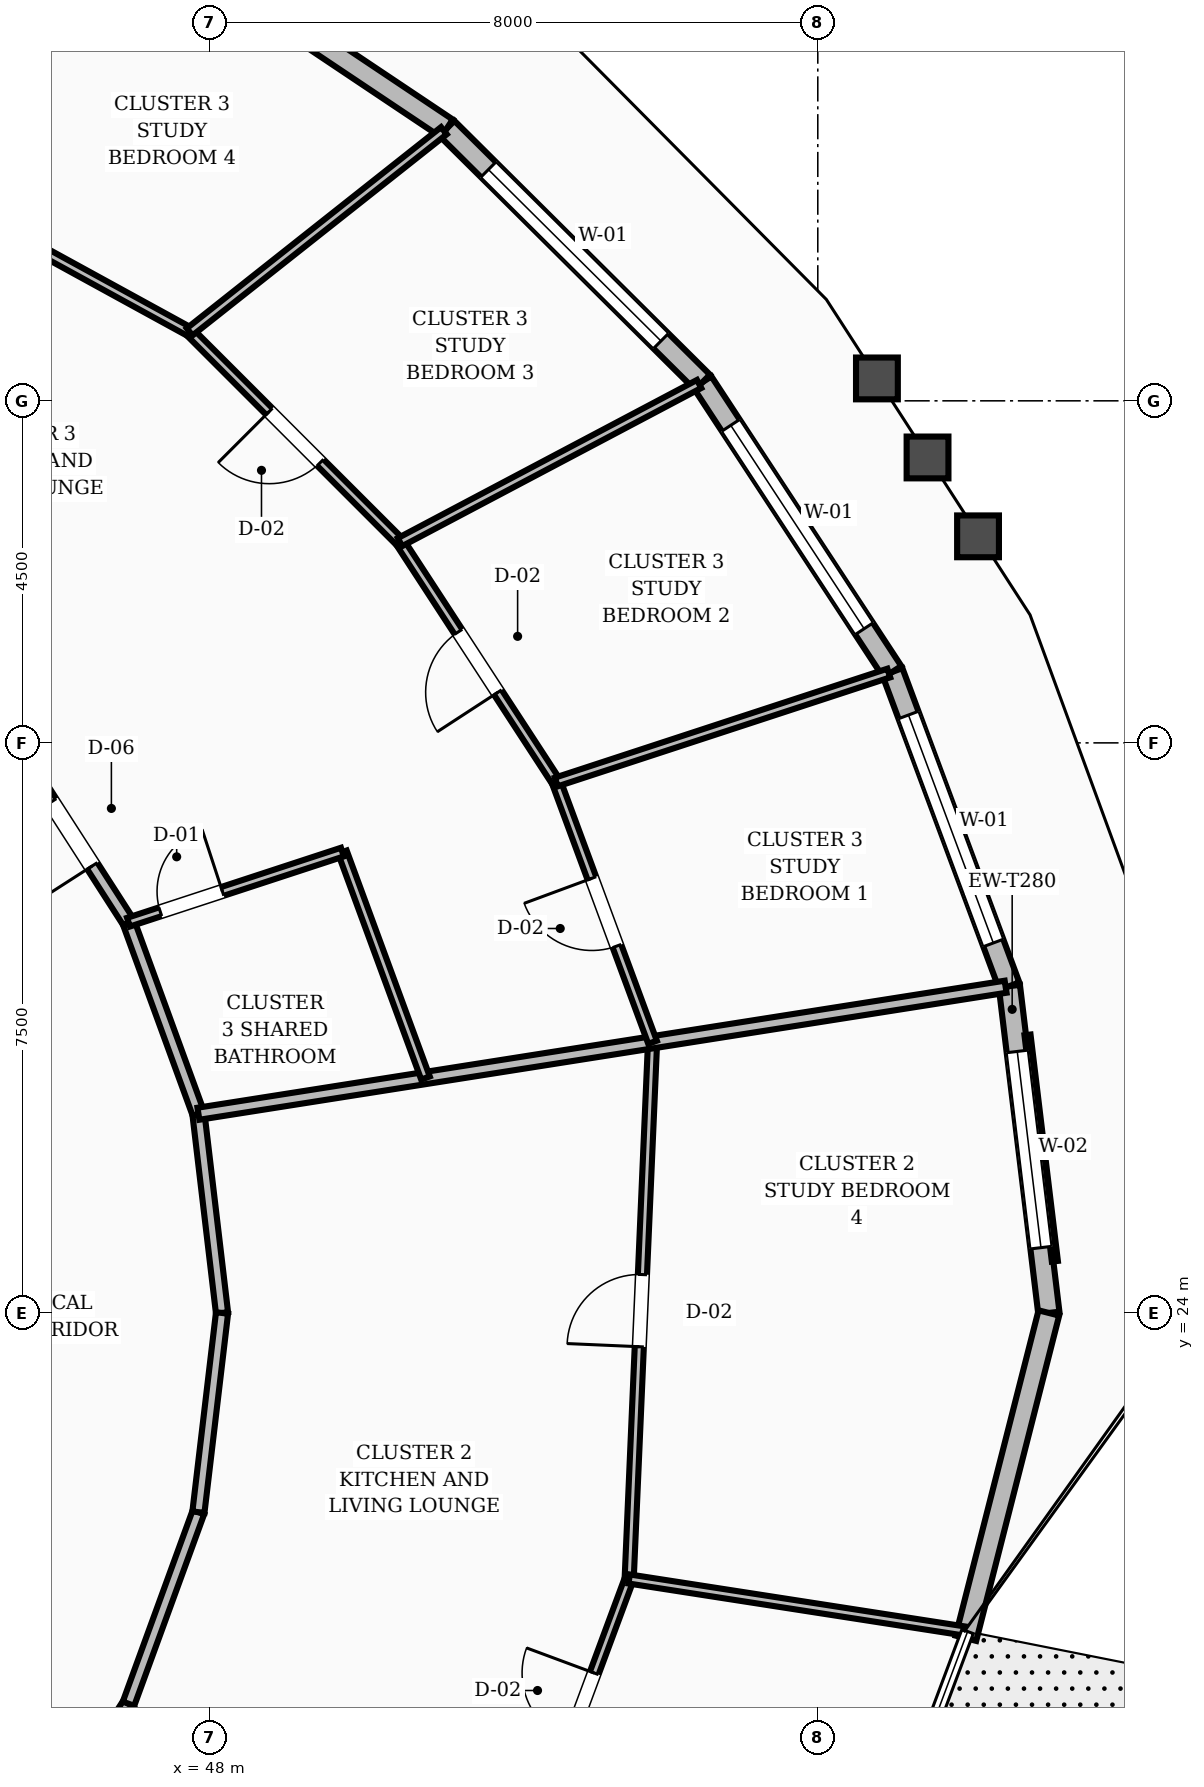
"""IFC4 building model, lengths in metres.
Left out: names, types, materials, properties, quantities, classifications, styles, units other than length and angle.
Written with IfcOpenShell. Run it as: python <this file> out.ifc"""

import sys

from ifc_helpers import new_model, si_unit, direction, frame, frame_2d, origin, place, context, subcontext, project, spatial, rectangle, extrude, element, fill, save


model = new_model("IFC4")
c1 = context("Model", 3, precision=1e-05, world=origin(), true_north=direction((0.0, 1.0)))
c2 = subcontext(c1, "Body", "Model", "MODEL_VIEW")
j1 = project(units=[si_unit("LENGTHUNIT", "METRE"), si_unit("PLANEANGLEUNIT", "RADIAN")], contexts=[c1])
p1 = place(None, origin())
s1 = spatial("IfcSite", under=j1, at=p1, CompositionType="ELEMENT")
p2 = place(p1, origin())
s2 = spatial("IfcBuilding", under=s1, at=p2, CompositionType="ELEMENT")
p3 = place(p2, frame((0.0, 0.0, 80.8)))
s3 = spatial("IfcBuildingStorey", under=s2, at=p3, CompositionType="ELEMENT", Elevation=80.8)
p4 = place(p3, frame((59.04, 24.0, 0.0), z_axis=(0.0, 0.0, 1.0), x_axis=(-0.119954269921, 0.992779418163, 0.0)))
e1 = element("IfcWall", 1, at=p4, inside=s3, PredefinedType="STANDARD", context=c2, shape_type="SweptSolid", body=[
    extrude(rectangle(XDim=4.331, YDim=0.28, at=frame_2d((2.166, 0.0))), origin(), (0.0, 0.0, 1.0), 2.71),
])
p5 = place(p4, frame((0.865, 0.0, 0.8)))
e2 = element("IfcOpeningElement", 2, at=p5, cuts=e1, PredefinedType="OPENING", context=c2, shape_type="SweptSolid", body=[
    extrude(rectangle(XDim=2.6, YDim=1.65, at=frame_2d((1.3, 0.825))), frame((0.0, 0.15, 0.0), z_axis=(0.0, -1.0, 0.0), x_axis=(1.0, 0.0, 0.0)), (0.0, 0.0, 1.0), 0.3),
])
p6 = place(p3, frame((58.521, 28.3, 0.0), z_axis=(0.0, 0.0, 1.0), x_axis=(-0.348811713435, 0.93719282358, 0.0)))
e3 = element("IfcWall", 3, at=p6, inside=s3, PredefinedType="STANDARD", context=c2, shape_type="SweptSolid", body=[
    extrude(rectangle(XDim=4.412, YDim=0.28, at=frame_2d((2.206, 0.0))), origin(), (0.0, 0.0, 1.0), 2.71),
])
p7 = place(p6, frame((0.606, 0.0, 0.8)))
e4 = element("IfcOpeningElement", 4, at=p7, cuts=e3, PredefinedType="OPENING", context=c2, shape_type="SweptSolid", body=[
    extrude(rectangle(XDim=3.2, YDim=1.65, at=frame_2d((1.6, 0.825))), frame((0.0, 0.15, 0.0), z_axis=(0.0, -1.0, 0.0), x_axis=(1.0, 0.0, 0.0)), (0.0, 0.0, 1.0), 0.3),
])
p8 = place(p3, frame((56.982, 32.434, 0.0), z_axis=(0.0, 0.0, 1.0), x_axis=(-0.54836617539, 0.83623832589, 0.0)))
e5 = element("IfcWall", 5, at=p8, inside=s3, PredefinedType="STANDARD", context=c2, shape_type="SweptSolid", body=[
    extrude(rectangle(XDim=4.557, YDim=0.28, at=frame_2d((2.278, 0.0))), origin(), (0.0, 0.0, 1.0), 2.71),
])
p9 = place(p8, frame((0.678, 0.0, 0.8)))
e6 = element("IfcOpeningElement", 6, at=p9, cuts=e5, PredefinedType="OPENING", context=c2, shape_type="SweptSolid", body=[
    extrude(rectangle(XDim=3.2, YDim=1.65, at=frame_2d((1.6, 0.825))), frame((0.0, 0.15, 0.0), z_axis=(0.0, -1.0, 0.0), x_axis=(1.0, 0.0, 0.0)), (0.0, 0.0, 1.0), 0.3),
])
p10 = place(p3, frame((54.483, 36.245, 0.0), z_axis=(0.0, 0.0, 1.0), x_axis=(-0.709523691603, 0.704681581322, 0.0)))
e7 = element("IfcWall", 7, at=p10, inside=s3, PredefinedType="STANDARD", context=c2, shape_type="SweptSolid", body=[
    extrude(rectangle(XDim=4.74, YDim=0.28, at=frame_2d((2.37, 0.0))), origin(), (0.0, 0.0, 1.0), 2.71),
])
p11 = place(p10, frame((0.77, 0.0, 0.8)))
e8 = element("IfcOpeningElement", 8, at=p11, cuts=e7, PredefinedType="OPENING", context=c2, shape_type="SweptSolid", body=[
    extrude(rectangle(XDim=3.2, YDim=1.65, at=frame_2d((1.6, 0.825))), frame((0.0, 0.15, 0.0), z_axis=(0.0, -1.0, 0.0), x_axis=(1.0, 0.0, 0.0)), (0.0, 0.0, 1.0), 0.3),
])
p12 = place(p3, frame((51.12, 39.585, 0.0), z_axis=(0.0, 0.0, 1.0), x_axis=(-0.831173050052, 0.556013813558, 0.0)))
e9 = element("IfcWall", 9, at=p12, inside=s3, PredefinedType="STANDARD", context=c2, shape_type="SweptSolid", body=[
    extrude(rectangle(XDim=4.93, YDim=0.28, at=frame_2d((2.465, 0.0))), origin(), (0.0, 0.0, 1.0), 2.71),
])
p13 = place(p3, frame((57.948, 19.72, 0.0), z_axis=(0.0, 0.0, 1.0), x_axis=(0.247150260181, 0.968977166342, 0.0)))
e10 = element("IfcWall", 10, at=p13, inside=s3, PredefinedType="STANDARD", context=c2, shape_type="SweptSolid", body=[
    extrude(rectangle(XDim=4.417, YDim=0.28, at=frame_2d((2.208, 0.0))), origin(), (0.0, 0.0, 1.0), 2.71),
])
p14 = place(p3, frame((48.162, 24.0, 0.0), z_axis=(0.0, 0.0, 1.0), x_axis=(-0.117667763342, 0.993053018459, 0.0)))
e11 = element("IfcWall", 11, at=p14, inside=s3, PredefinedType="SOLIDWALL", context=c2, shape_type="SweptSolid", body=[
    extrude(rectangle(XDim=2.639, YDim=0.16, at=frame_2d((1.32, 0.0))), origin(), (0.0, 0.0, 1.0), 2.71),
])
p15 = place(p3, frame((47.852, 26.621, 0.0), z_axis=(0.0, 0.0, 1.0), x_axis=(-0.342882618672, 0.939378257047, 0.0)))
e12 = element("IfcWall", 12, at=p15, inside=s3, PredefinedType="SOLIDWALL", context=c2, shape_type="SweptSolid", body=[
    extrude(rectangle(XDim=2.683, YDim=0.16, at=frame_2d((1.341, 0.0))), origin(), (0.0, 0.0, 1.0), 2.71),
])
p16 = place(p3, frame((46.932, 29.141, 0.0), z_axis=(0.0, 0.0, 1.0), x_axis=(-0.540891657444, 0.841092274907, 0.0)))
e13 = element("IfcWall", 13, at=p16, inside=s3, PredefinedType="SOLIDWALL", context=c2, shape_type="SweptSolid", body=[
    extrude(rectangle(XDim=2.761, YDim=0.16, at=frame_2d((1.38, 0.0))), origin(), (0.0, 0.0, 1.0), 2.71),
])
p17 = place(p16, frame((0.881, 0.0, 0.0)))
e14 = element("IfcOpeningElement", 14, at=p17, cuts=e13, PredefinedType="OPENING", context=c2, shape_type="SweptSolid", body=[
    extrude(rectangle(XDim=1.0, YDim=2.1, at=frame_2d((0.5, 1.05))), frame((0.0, 0.09, 0.0), z_axis=(0.0, -1.0, 0.0), x_axis=(1.0, 0.0, 0.0)), (0.0, 0.0, 1.0), 0.18),
])
p18 = place(p3, frame((45.438, 16.537, 0.0), z_axis=(0.0, 0.0, 1.0), x_axis=(0.540891657444, 0.841092274907, 0.0)))
e15 = element("IfcWall", 15, at=p18, inside=s3, PredefinedType="SOLIDWALL", context=c2, shape_type="SweptSolid", body=[
    extrude(rectangle(XDim=2.761, YDim=0.16, at=frame_2d((1.38, 0.0))), origin(), (0.0, 0.0, 1.0), 2.71),
])
p19 = place(p18, frame((0.881, 0.0, 0.0)))
e16 = element("IfcOpeningElement", 16, at=p19, cuts=e15, PredefinedType="OPENING", context=c2, shape_type="SweptSolid", body=[
    extrude(rectangle(XDim=1.0, YDim=2.1, at=frame_2d((0.5, 1.05))), frame((0.0, 0.09, 0.0), z_axis=(0.0, -1.0, 0.0), x_axis=(1.0, 0.0, 0.0)), (0.0, 0.0, 1.0), 0.18),
])
p20 = place(p3, frame((46.932, 18.859, 0.0), z_axis=(0.0, 0.0, 1.0), x_axis=(0.342882618672, 0.939378257047, 0.0)))
e17 = element("IfcWall", 17, at=p20, inside=s3, PredefinedType="SOLIDWALL", context=c2, shape_type="SweptSolid", body=[
    extrude(rectangle(XDim=2.683, YDim=0.16, at=frame_2d((1.341, 0.0))), origin(), (0.0, 0.0, 1.0), 2.71),
])
p21 = place(p3, frame((47.852, 21.379, 0.0), z_axis=(0.0, 0.0, 1.0), x_axis=(0.117667763342, 0.993053018459, 0.0)))
e18 = element("IfcWall", 18, at=p21, inside=s3, PredefinedType="SOLIDWALL", context=c2, shape_type="SweptSolid", body=[
    extrude(rectangle(XDim=2.639, YDim=0.16, at=frame_2d((1.32, 0.0))), origin(), (0.0, 0.0, 1.0), 2.71),
])
p22 = place(p3, frame((52.27, 17.135, 0.0), z_axis=(0.0, 0.0, 1.0), x_axis=(0.347819358627, 0.937561567986, 0.0)))
e19 = element("IfcWall", 19, at=p22, inside=s3, PredefinedType="PARTITIONING", context=c2, shape_type="SweptSolid", body=[
    extrude(rectangle(XDim=3.59, YDim=0.12, at=frame_2d((1.795, 0.0))), origin(), (0.0, 0.0, 1.0), 2.71),
])
p23 = place(p22, frame((1.32, 0.0, 0.0)))
e20 = element("IfcOpeningElement", 20, at=p23, cuts=e19, PredefinedType="OPENING", context=c2, shape_type="SweptSolid", body=[
    extrude(rectangle(XDim=0.95, YDim=2.1, at=frame_2d((0.475, 1.05))), frame((0.0, 0.07, 0.0), z_axis=(0.0, -1.0, 0.0), x_axis=(1.0, 0.0, 0.0)), (0.0, 0.0, 1.0), 0.14),
])
p24 = place(p3, frame((53.519, 20.5, 0.0), z_axis=(0.0, 0.0, 1.0), x_axis=(0.043525670249, 0.999052308956, 0.0)))
e21 = element("IfcWall", 21, at=p24, inside=s3, PredefinedType="PARTITIONING", context=c2, shape_type="SweptSolid", body=[
    extrude(rectangle(XDim=7.067, YDim=0.12, at=frame_2d((3.534, 0.0))), origin(), (0.0, 0.0, 1.0), 2.71),
])
p25 = place(p24, frame((3.059, 0.0, 0.0)))
e22 = element("IfcOpeningElement", 22, at=p25, cuts=e21, PredefinedType="OPENING", context=c2, shape_type="SweptSolid", body=[
    extrude(rectangle(XDim=0.95, YDim=2.1, at=frame_2d((0.475, 1.05))), frame((0.0, 0.07, 0.0), z_axis=(0.0, -1.0, 0.0), x_axis=(1.0, 0.0, 0.0)), (0.0, 0.0, 1.0), 0.14),
])
p26 = place(p3, frame((53.519, 20.5, 0.0), z_axis=(0.0, 0.0, 1.0), x_axis=(0.988179628111, -0.153300432438, 0.0)))
e23 = element("IfcWall", 23, at=p26, inside=s3, PredefinedType="PARTITIONING", context=c2, shape_type="SweptSolid", body=[
    extrude(rectangle(XDim=4.456, YDim=0.12, at=frame_2d((2.228, 0.0))), origin(), (0.0, 0.0, 1.0), 2.71),
])
p27 = place(p3, frame((47.852, 26.621, 0.0), z_axis=(0.0, 0.0, 1.0), x_axis=(0.987843119508, 0.155454080811, 0.0)))
e24 = element("IfcWall", 24, at=p27, inside=s3, PredefinedType="SOLIDWALL", context=c2, shape_type="SweptSolid", body=[
    extrude(rectangle(XDim=10.75, YDim=0.16, at=frame_2d((5.375, 0.0))), origin(), (0.0, 0.0, 1.0), 2.71),
])
p28 = place(p3, frame((50.839, 27.091, 0.0), z_axis=(0.0, 0.0, 1.0), x_axis=(-0.34521944279, 0.938521995651, 0.0)))
e25 = element("IfcWall", 25, at=p28, inside=s3, PredefinedType="PARTITIONING", context=c2, shape_type="SweptSolid", body=[
    extrude(rectangle(XDim=3.167, YDim=0.12, at=frame_2d((1.583, 0.0))), origin(), (0.0, 0.0, 1.0), 2.71),
])
p29 = place(p3, frame((46.932, 29.141, 0.0), z_axis=(0.0, 0.0, 1.0), x_axis=(0.950303140024, 0.311326102441, 0.0)))
e26 = element("IfcWall", 26, at=p29, inside=s3, PredefinedType="PARTITIONING", context=c2, shape_type="SweptSolid", body=[
    extrude(rectangle(XDim=2.961, YDim=0.12, at=frame_2d((1.48, 0.0))), origin(), (0.0, 0.0, 1.0), 2.71),
])
p30 = place(p29, frame((0.44, 0.0, 0.0)))
e27 = element("IfcOpeningElement", 27, at=p30, cuts=e26, PredefinedType="OPENING", context=c2, shape_type="SweptSolid", body=[
    extrude(rectangle(XDim=0.86, YDim=2.1, at=frame_2d((0.43, 1.05))), frame((0.0, 0.07, 0.0), z_axis=(0.0, -1.0, 0.0), x_axis=(1.0, 0.0, 0.0)), (0.0, 0.0, 1.0), 0.14),
])
p31 = place(p3, frame((53.826, 27.561, 0.0), z_axis=(0.0, 0.0, 1.0), x_axis=(-0.346876529869, 0.937910802276, 0.0)))
e28 = element("IfcWall", 28, at=p31, inside=s3, PredefinedType="PARTITIONING", context=c2, shape_type="SweptSolid", body=[
    extrude(rectangle(XDim=3.651, YDim=0.12, at=frame_2d((1.825, 0.0))), origin(), (0.0, 0.0, 1.0), 2.71),
])
p32 = place(p31, frame((1.35, 0.0, 0.0)))
e29 = element("IfcOpeningElement", 29, at=p32, cuts=e28, PredefinedType="OPENING", context=c2, shape_type="SweptSolid", body=[
    extrude(rectangle(XDim=0.95, YDim=2.1, at=frame_2d((0.475, 1.05))), frame((0.0, 0.07, 0.0), z_axis=(0.0, -1.0, 0.0), x_axis=(1.0, 0.0, 0.0)), (0.0, 0.0, 1.0), 0.14),
])
p33 = place(p3, frame((52.56, 30.985, 0.0), z_axis=(0.0, 0.0, 1.0), x_axis=(-0.545965266382, 0.83780781084, 0.0)))
e30 = element("IfcWall", 30, at=p33, inside=s3, PredefinedType="PARTITIONING", context=c2, shape_type="SweptSolid", body=[
    extrude(rectangle(XDim=3.767, YDim=0.12, at=frame_2d((1.884, 0.0))), origin(), (0.0, 0.0, 1.0), 2.71),
])
p34 = place(p33, frame((1.408, 0.0, 0.0)))
e31 = element("IfcOpeningElement", 31, at=p34, cuts=e30, PredefinedType="OPENING", context=c2, shape_type="SweptSolid", body=[
    extrude(rectangle(XDim=0.95, YDim=2.1, at=frame_2d((0.475, 1.05))), frame((0.0, 0.07, 0.0), z_axis=(0.0, -1.0, 0.0), x_axis=(1.0, 0.0, 0.0)), (0.0, 0.0, 1.0), 0.14),
])
p35 = place(p3, frame((52.56, 30.985, 0.0), z_axis=(0.0, 0.0, 1.0), x_axis=(0.950267629024, 0.311434476622, 0.0)))
e32 = element("IfcWall", 32, at=p35, inside=s3, PredefinedType="PARTITIONING", context=c2, shape_type="SweptSolid", body=[
    extrude(rectangle(XDim=4.603, YDim=0.12, at=frame_2d((2.302, 0.0))), origin(), (0.0, 0.0, 1.0), 2.71),
])
p36 = place(p3, frame((50.503, 34.141, 0.0), z_axis=(0.0, 0.0, 1.0), x_axis=(-0.707293953749, 0.706919559066, 0.0)))
e33 = element("IfcWall", 33, at=p36, inside=s3, PredefinedType="PARTITIONING", context=c2, shape_type="SweptSolid", body=[
    extrude(rectangle(XDim=3.913, YDim=0.12, at=frame_2d((1.956, 0.0))), origin(), (0.0, 0.0, 1.0), 2.71),
])
p37 = place(p36, frame((1.481, 0.0, 0.0)))
e34 = element("IfcOpeningElement", 34, at=p37, cuts=e33, PredefinedType="OPENING", context=c2, shape_type="SweptSolid", body=[
    extrude(rectangle(XDim=0.95, YDim=2.1, at=frame_2d((0.475, 1.05))), frame((0.0, 0.07, 0.0), z_axis=(0.0, -1.0, 0.0), x_axis=(1.0, 0.0, 0.0)), (0.0, 0.0, 1.0), 0.14),
])
p38 = place(p3, frame((50.503, 34.141, 0.0), z_axis=(0.0, 0.0, 1.0), x_axis=(0.884085229331, 0.467325697216, 0.0)))
e35 = element("IfcWall", 35, at=p38, inside=s3, PredefinedType="PARTITIONING", context=c2, shape_type="SweptSolid", body=[
    extrude(rectangle(XDim=4.452, YDim=0.12, at=frame_2d((2.226, 0.0))), origin(), (0.0, 0.0, 1.0), 2.71),
])
p39 = place(p3, frame((47.736, 36.907, 0.0), z_axis=(0.0, 0.0, 1.0), x_axis=(-0.876923693875, 0.480629623641, 0.0)))
e36 = element("IfcWall", 36, at=p39, inside=s3, PredefinedType="PARTITIONING", context=c2, shape_type="SweptSolid", body=[
    extrude(rectangle(XDim=8.233, YDim=0.12, at=frame_2d((4.116, 0.0))), origin(), (0.0, 0.0, 1.0), 2.71),
])
p40 = place(p39, frame((3.642, 0.0, 0.0)))
e37 = element("IfcOpeningElement", 37, at=p40, cuts=e36, PredefinedType="OPENING", context=c2, shape_type="SweptSolid", body=[
    extrude(rectangle(XDim=0.95, YDim=2.1, at=frame_2d((0.475, 1.05))), frame((0.0, 0.07, 0.0), z_axis=(0.0, -1.0, 0.0), x_axis=(1.0, 0.0, 0.0)), (0.0, 0.0, 1.0), 0.14),
])
p41 = place(p3, frame((47.736, 36.907, 0.0), z_axis=(0.0, 0.0, 1.0), x_axis=(0.784224519378, 0.620477157683, 0.0)))
e38 = element("IfcWall", 38, at=p41, inside=s3, PredefinedType="PARTITIONING", context=c2, shape_type="SweptSolid", body=[
    extrude(rectangle(XDim=4.266, YDim=0.12, at=frame_2d((2.133, 0.0))), origin(), (0.0, 0.0, 1.0), 2.71),
])
p42 = place(p5, origin())
e39 = element("IfcWindow", 39, at=p42, inside=s3, PartitioningType="SINGLE_PANEL", PredefinedType="WINDOW", context=c2, shape_type="SweptSolid", body=[
    extrude(rectangle(XDim=2.6, YDim=1.65, at=frame_2d((1.3, 0.825))), frame((0.0, 0.03, 0.0), z_axis=(0.0, -1.0, 0.0), x_axis=(1.0, 0.0, 0.0)), (0.0, 0.0, 1.0), 0.06),
])
fill(e2, e39)
p43 = place(p7, origin())
e40 = element("IfcWindow", 40, at=p43, inside=s3, PartitioningType="SINGLE_PANEL", PredefinedType="WINDOW", context=c2, shape_type="SweptSolid", body=[
    extrude(rectangle(XDim=3.2, YDim=1.65, at=frame_2d((1.6, 0.825))), frame((0.0, 0.03, 0.0), z_axis=(0.0, -1.0, 0.0), x_axis=(1.0, 0.0, 0.0)), (0.0, 0.0, 1.0), 0.06),
])
fill(e4, e40)
p44 = place(p9, origin())
e41 = element("IfcWindow", 41, at=p44, inside=s3, PartitioningType="SINGLE_PANEL", PredefinedType="WINDOW", context=c2, shape_type="SweptSolid", body=[
    extrude(rectangle(XDim=3.2, YDim=1.65, at=frame_2d((1.6, 0.825))), frame((0.0, 0.03, 0.0), z_axis=(0.0, -1.0, 0.0), x_axis=(1.0, 0.0, 0.0)), (0.0, 0.0, 1.0), 0.06),
])
fill(e6, e41)
p45 = place(p11, origin())
e42 = element("IfcWindow", 42, at=p45, inside=s3, PartitioningType="SINGLE_PANEL", PredefinedType="WINDOW", context=c2, shape_type="SweptSolid", body=[
    extrude(rectangle(XDim=3.2, YDim=1.65, at=frame_2d((1.6, 0.825))), frame((0.0, 0.03, 0.0), z_axis=(0.0, -1.0, 0.0), x_axis=(1.0, 0.0, 0.0)), (0.0, 0.0, 1.0), 0.06),
])
fill(e8, e42)
p46 = place(p23, origin())
e43 = element("IfcDoor", 43, at=p46, inside=s3, OperationType="SINGLE_SWING_RIGHT", PredefinedType="DOOR", context=c2, shape_type="SweptSolid", body=[
    extrude(rectangle(XDim=0.95, YDim=2.1, at=frame_2d((0.475, 1.05))), frame((0.0, 0.025, 0.0), z_axis=(0.0, -1.0, 0.0), x_axis=(1.0, 0.0, 0.0)), (0.0, 0.0, 1.0), 0.05),
])
fill(e20, e43)
p47 = place(p25, origin())
e44 = element("IfcDoor", 44, at=p47, inside=s3, OperationType="SINGLE_SWING_LEFT", PredefinedType="DOOR", context=c2, shape_type="SweptSolid", body=[
    extrude(rectangle(XDim=0.95, YDim=2.1, at=frame_2d((0.475, 1.05))), frame((0.0, 0.025, 0.0), z_axis=(0.0, -1.0, 0.0), x_axis=(1.0, 0.0, 0.0)), (0.0, 0.0, 1.0), 0.05),
])
fill(e22, e44)
p48 = place(p30, origin())
e45 = element("IfcDoor", 45, at=p48, inside=s3, OperationType="SINGLE_SWING_RIGHT", PredefinedType="DOOR", context=c2, shape_type="SweptSolid", body=[
    extrude(rectangle(XDim=0.86, YDim=2.1, at=frame_2d((0.43, 1.05))), frame((0.0, 0.025, 0.0), z_axis=(0.0, -1.0, 0.0), x_axis=(1.0, 0.0, 0.0)), (0.0, 0.0, 1.0), 0.05),
])
fill(e27, e45)
p49 = place(p17, origin())
e46 = element("IfcDoor", 46, at=p49, inside=s3, OperationType="SINGLE_SWING_LEFT", PredefinedType="DOOR", context=c2, shape_type="SweptSolid", body=[
    extrude(rectangle(XDim=1.0, YDim=2.1, at=frame_2d((0.5, 1.05))), frame((0.0, 0.025, 0.0), z_axis=(0.0, -1.0, 0.0), x_axis=(1.0, 0.0, 0.0)), (0.0, 0.0, 1.0), 0.05),
])
fill(e14, e46)
p50 = place(p32, origin())
e47 = element("IfcDoor", 47, at=p50, inside=s3, OperationType="SINGLE_SWING_RIGHT", PredefinedType="DOOR", context=c2, shape_type="SweptSolid", body=[
    extrude(rectangle(XDim=0.95, YDim=2.1, at=frame_2d((0.475, 1.05))), frame((0.0, 0.025, 0.0), z_axis=(0.0, -1.0, 0.0), x_axis=(1.0, 0.0, 0.0)), (0.0, 0.0, 1.0), 0.05),
])
fill(e29, e47)
p51 = place(p34, origin())
e48 = element("IfcDoor", 48, at=p51, inside=s3, OperationType="SINGLE_SWING_LEFT", PredefinedType="DOOR", context=c2, shape_type="SweptSolid", body=[
    extrude(rectangle(XDim=0.95, YDim=2.1, at=frame_2d((0.475, 1.05))), frame((0.0, 0.025, 0.0), z_axis=(0.0, -1.0, 0.0), x_axis=(1.0, 0.0, 0.0)), (0.0, 0.0, 1.0), 0.05),
])
fill(e31, e48)
p52 = place(p37, origin())
e49 = element("IfcDoor", 49, at=p52, inside=s3, OperationType="SINGLE_SWING_RIGHT", PredefinedType="DOOR", context=c2, shape_type="SweptSolid", body=[
    extrude(rectangle(XDim=0.95, YDim=2.1, at=frame_2d((0.475, 1.05))), frame((0.0, 0.025, 0.0), z_axis=(0.0, -1.0, 0.0), x_axis=(1.0, 0.0, 0.0)), (0.0, 0.0, 1.0), 0.05),
])
fill(e34, e49)
save(model, sys.argv[1])
